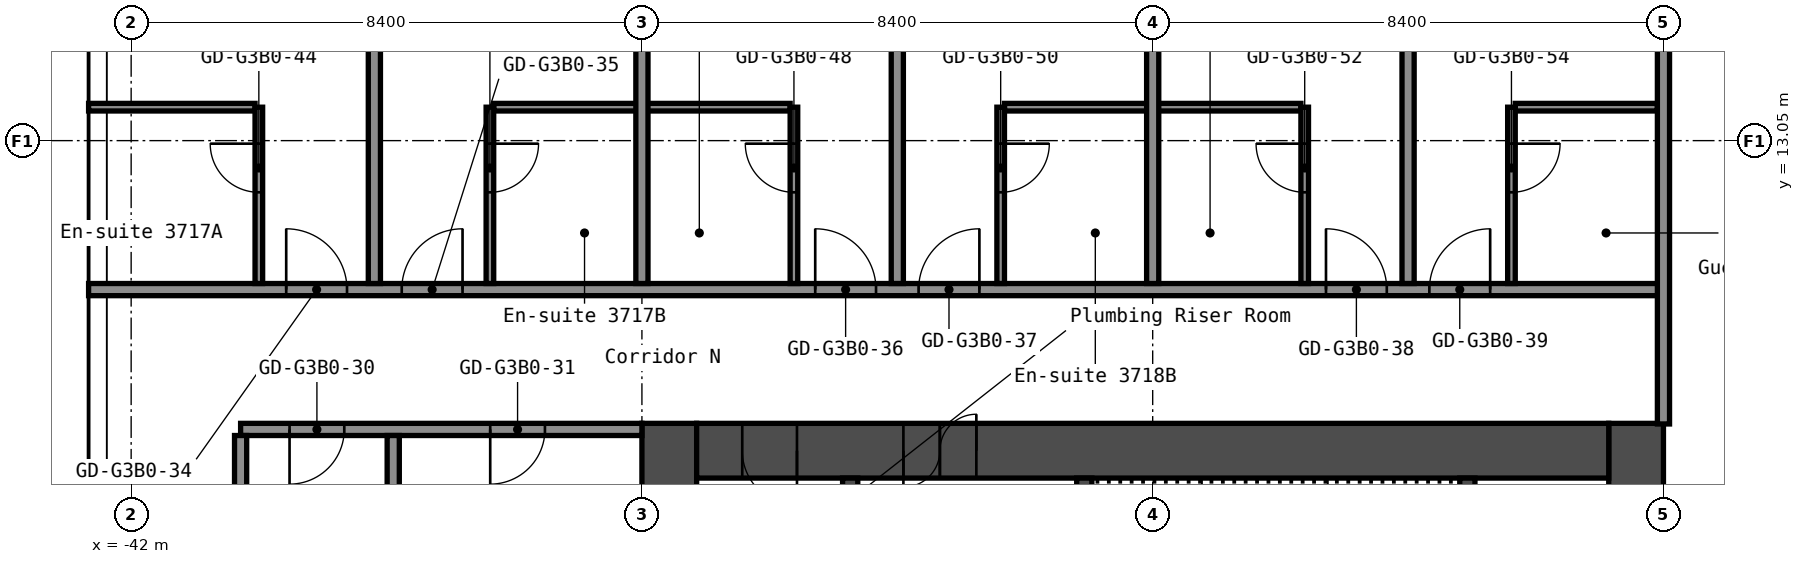
"""IFC4 building model, lengths in metres.
Left out: names, types, materials, properties, quantities, classifications, styles, units other than length and angle.
Written with IfcOpenShell. Run it as: python <this file> out.ifc"""

import sys

from ifc_helpers import new_model, si_unit, direction, frame, frame_2d, origin, place, context, subcontext, project, spatial, rectangle, extrude, element, fill, save


model = new_model("IFC4")
c1 = context("Model", 3, precision=1e-05, world=origin(), true_north=direction((0.0, 1.0)))
c2 = subcontext(c1, "Body", "Model", "MODEL_VIEW")
j1 = project(units=[si_unit("LENGTHUNIT", "METRE"), si_unit("PLANEANGLEUNIT", "RADIAN")], contexts=[c1])
p1 = place(None, origin())
s1 = spatial("IfcSite", under=j1, at=p1, CompositionType="ELEMENT")
p2 = place(p1, origin())
s2 = spatial("IfcBuilding", under=s1, at=p2, CompositionType="ELEMENT")
p3 = place(p2, frame((0.0, 0.0, 134.2)))
s3 = spatial("IfcBuildingStorey", under=s2, at=p3, CompositionType="ELEMENT", Elevation=134.2)
p4 = place(p3, frame((-17.25, -8.4, 0.0), z_axis=(0.0, 0.0, 1.0), x_axis=(0.0, 1.0, 0.0)))
e1 = element("IfcWall", 1, at=p4, inside=s3, PredefinedType="SHEAR", context=c2, shape_type="SweptSolid", body=[
    extrude(rectangle(XDim=16.8, YDim=0.9, at=frame_2d((8.4, 0.0))), origin(), (0.0, 0.0, 1.0), 2.75),
])
p5 = place(p4, frame((7.1, 0.0, 0.0)))
e2 = element("IfcOpeningElement", 2, at=p5, cuts=e1, PredefinedType="OPENING", context=c2, shape_type="SweptSolid", body=[
    extrude(rectangle(XDim=1.6, YDim=2.1, at=frame_2d((0.8, 1.05))), frame((0.0, 0.46, 0.0), z_axis=(0.0, -1.0, 0.0), x_axis=(1.0, 0.0, 0.0)), (0.0, 0.0, 1.0), 0.92),
])
p6 = place(p3, frame((-33.15, -8.4, 0.0), z_axis=(0.0, 0.0, 1.0), x_axis=(0.0, 1.0, 0.0)))
e3 = element("IfcWall", 3, at=p6, inside=s3, PredefinedType="SHEAR", context=c2, shape_type="SweptSolid", body=[
    extrude(rectangle(XDim=16.8, YDim=0.9, at=frame_2d((8.4, 0.0))), origin(), (0.0, 0.0, 1.0), 2.75),
])
p7 = place(p3, frame((-32.7, 7.95, 0.0), z_axis=(0.0, 0.0, 1.0), x_axis=(1.0, 0.0, 0.0)))
e4 = element("IfcWall", 4, at=p7, inside=s3, PredefinedType="SHEAR", context=c2, shape_type="SweptSolid", body=[
    extrude(rectangle(XDim=15.0, YDim=0.9, at=frame_2d((7.5, 0.0))), origin(), (0.0, 0.0, 1.0), 2.75),
])
p8 = place(p7, frame((3.4, 0.0, 0.0)))
e5 = element("IfcOpeningElement", 5, at=p8, cuts=e4, PredefinedType="OPENING", context=c2, shape_type="SweptSolid", body=[
    extrude(rectangle(XDim=1.2, YDim=2.1, at=frame_2d((0.6, 1.05))), frame((0.0, 0.46, 0.0), z_axis=(0.0, -1.0, 0.0), x_axis=(1.0, 0.0, 0.0)), (0.0, 0.0, 1.0), 0.92),
])
p9 = place(p7, frame((0.75, 0.0, 0.0)))
e6 = element("IfcOpeningElement", 6, at=p9, cuts=e4, PredefinedType="OPENING", context=c2, shape_type="SweptSolid", body=[
    extrude(rectangle(XDim=0.9, YDim=2.1, at=frame_2d((0.45, 1.05))), frame((0.0, 0.46, 0.0), z_axis=(0.0, -1.0, 0.0), x_axis=(1.0, 0.0, 0.0)), (0.0, 0.0, 1.0), 0.92),
])
p10 = place(p3, frame((-20.025, 1.2, 0.0), z_axis=(0.0, 0.0, 1.0), x_axis=(0.0, 1.0, 0.0)))
e7 = element("IfcWall", 7, at=p10, inside=s3, PredefinedType="SHEAR", context=c2, shape_type="SweptSolid", body=[
    extrude(rectangle(XDim=6.3, YDim=0.25, at=frame_2d((3.15, 0.0))), origin(), (0.0, 0.0, 1.0), 2.75),
])
p11 = place(p3, frame((-26.325, 3.75, 0.0), z_axis=(0.0, 0.0, 1.0), x_axis=(0.0, 1.0, 0.0)))
e8 = element("IfcWall", 8, at=p11, inside=s3, PredefinedType="SHEAR", context=c2, shape_type="SweptSolid", body=[
    extrude(rectangle(XDim=3.75, YDim=0.25, at=frame_2d((1.875, 0.0))), origin(), (0.0, 0.0, 1.0), 2.75),
])
p12 = place(p11, frame((1.25, 0.0, 0.0)))
e9 = element("IfcOpeningElement", 9, at=p12, cuts=e8, PredefinedType="OPENING", context=c2, shape_type="SweptSolid", body=[
    extrude(rectangle(XDim=1.2, YDim=2.1, at=frame_2d((0.6, 1.05))), frame((0.0, 0.135, 0.0), z_axis=(0.0, -1.0, 0.0), x_axis=(1.0, 0.0, 0.0)), (0.0, 0.0, 1.0), 0.27),
])
p13 = place(p3, frame((-30.175, 1.45, 0.0), z_axis=(0.0, 0.0, 1.0), x_axis=(0.0, 1.0, 0.0)))
e10 = element("IfcWall", 10, at=p13, inside=s3, PredefinedType="SHEAR", context=c2, shape_type="SweptSolid", body=[
    extrude(rectangle(XDim=6.05, YDim=0.25, at=frame_2d((3.025, 0.0))), origin(), (0.0, 0.0, 1.0), 2.75),
])
p14 = place(p13, frame((2.625, 0.0, 0.0)))
e11 = element("IfcOpeningElement", 11, at=p14, cuts=e10, PredefinedType="OPENING", context=c2, shape_type="SweptSolid", body=[
    extrude(rectangle(XDim=1.1, YDim=2.1, at=frame_2d((0.55, 1.05))), frame((0.0, 0.135, 0.0), z_axis=(0.0, -1.0, 0.0), x_axis=(1.0, 0.0, 0.0)), (0.0, 0.0, 1.0), 0.27),
])
p15 = place(p3, frame((-40.2, 8.3, 0.0), z_axis=(0.0, 0.0, 1.0), x_axis=(1.0, 0.0, 0.0)))
e12 = element("IfcWall", 12, at=p15, inside=s3, PredefinedType="PARTITIONING", context=c2, shape_type="SweptSolid", body=[
    extrude(rectangle(XDim=6.6, YDim=0.2, at=frame_2d((3.3, 0.0))), origin(), (0.0, 0.0, 1.0), 2.75),
])
p16 = place(p15, frame((0.805, 0.0, 0.0)))
e13 = element("IfcOpeningElement", 13, at=p16, cuts=e12, PredefinedType="OPENING", context=c2, shape_type="SweptSolid", body=[
    extrude(rectangle(XDim=0.9, YDim=2.1, at=frame_2d((0.45, 1.05))), frame((0.0, 0.11, 0.0), z_axis=(0.0, -1.0, 0.0), x_axis=(1.0, 0.0, 0.0)), (0.0, 0.0, 1.0), 0.22),
])
p17 = place(p15, frame((4.105, 0.0, 0.0)))
e14 = element("IfcOpeningElement", 14, at=p17, cuts=e12, PredefinedType="OPENING", context=c2, shape_type="SweptSolid", body=[
    extrude(rectangle(XDim=0.9, YDim=2.1, at=frame_2d((0.45, 1.05))), frame((0.0, 0.11, 0.0), z_axis=(0.0, -1.0, 0.0), x_axis=(1.0, 0.0, 0.0)), (0.0, 0.0, 1.0), 0.22),
])
p18 = place(p3, frame((-42.7, 10.6, 0.0), z_axis=(0.0, 0.0, 1.0), x_axis=(1.0, 0.0, 0.0)))
e15 = element("IfcWall", 15, at=p18, inside=s3, PredefinedType="PARTITIONING", context=c2, shape_type="SweptSolid", body=[
    extrude(rectangle(XDim=25.9, YDim=0.2, at=frame_2d((12.95, 0.0))), origin(), (0.0, 0.0, 1.0), 2.75),
])
p19 = place(p18, frame((3.25, 0.0, 0.0)))
e16 = element("IfcOpeningElement", 16, at=p19, cuts=e15, PredefinedType="OPENING", context=c2, shape_type="SweptSolid", body=[
    extrude(rectangle(XDim=1.0, YDim=2.1, at=frame_2d((0.5, 1.05))), frame((0.0, 0.11, 0.0), z_axis=(0.0, -1.0, 0.0), x_axis=(1.0, 0.0, 0.0)), (0.0, 0.0, 1.0), 0.22),
])
p20 = place(p18, frame((5.15, 0.0, 0.0)))
e17 = element("IfcOpeningElement", 17, at=p20, cuts=e15, PredefinedType="OPENING", context=c2, shape_type="SweptSolid", body=[
    extrude(rectangle(XDim=1.0, YDim=2.1, at=frame_2d((0.5, 1.05))), frame((0.0, 0.11, 0.0), z_axis=(0.0, -1.0, 0.0), x_axis=(1.0, 0.0, 0.0)), (0.0, 0.0, 1.0), 0.22),
])
p21 = place(p18, frame((11.95, 0.0, 0.0)))
e18 = element("IfcOpeningElement", 18, at=p21, cuts=e15, PredefinedType="OPENING", context=c2, shape_type="SweptSolid", body=[
    extrude(rectangle(XDim=1.0, YDim=2.1, at=frame_2d((0.5, 1.05))), frame((0.0, 0.11, 0.0), z_axis=(0.0, -1.0, 0.0), x_axis=(1.0, 0.0, 0.0)), (0.0, 0.0, 1.0), 0.22),
])
p22 = place(p18, frame((13.65, 0.0, 0.0)))
e19 = element("IfcOpeningElement", 19, at=p22, cuts=e15, PredefinedType="OPENING", context=c2, shape_type="SweptSolid", body=[
    extrude(rectangle(XDim=1.0, YDim=2.1, at=frame_2d((0.5, 1.05))), frame((0.0, 0.11, 0.0), z_axis=(0.0, -1.0, 0.0), x_axis=(1.0, 0.0, 0.0)), (0.0, 0.0, 1.0), 0.22),
])
p23 = place(p18, frame((20.35, 0.0, 0.0)))
e20 = element("IfcOpeningElement", 20, at=p23, cuts=e15, PredefinedType="OPENING", context=c2, shape_type="SweptSolid", body=[
    extrude(rectangle(XDim=1.0, YDim=2.1, at=frame_2d((0.5, 1.05))), frame((0.0, 0.11, 0.0), z_axis=(0.0, -1.0, 0.0), x_axis=(1.0, 0.0, 0.0)), (0.0, 0.0, 1.0), 0.22),
])
p24 = place(p18, frame((22.05, 0.0, 0.0)))
e21 = element("IfcOpeningElement", 21, at=p24, cuts=e15, PredefinedType="OPENING", context=c2, shape_type="SweptSolid", body=[
    extrude(rectangle(XDim=1.0, YDim=2.1, at=frame_2d((0.5, 1.05))), frame((0.0, 0.11, 0.0), z_axis=(0.0, -1.0, 0.0), x_axis=(1.0, 0.0, 0.0)), (0.0, 0.0, 1.0), 0.22),
])
p25 = place(p3, frame((-42.7, 13.6, 0.0), z_axis=(0.0, 0.0, 1.0), x_axis=(1.0, 0.0, 0.0)))
e22 = element("IfcWall", 22, at=p25, inside=s3, PredefinedType="PARTITIONING", context=c2, shape_type="SweptSolid", body=[
    extrude(rectangle(XDim=2.738, YDim=0.125, at=frame_2d((1.369, 0.0))), origin(), (0.0, 0.0, 1.0), 2.75),
])
for number, where, z_axis, x_axis in (
    (23, (-36.038, 13.6, 0.0), (0.0, 0.0, 1.0), (1.0, 0.0, 0.0)),
    (24, (-27.637, 13.6, 0.0), (0.0, 0.0, 1.0), (1.0, 0.0, 0.0)),
):
    element("IfcWall", number, at=place(p3, frame(where, z_axis=z_axis, x_axis=x_axis)), inside=s3, PredefinedType="PARTITIONING", context=c2, shape_type="SweptSolid", body=[
        extrude(rectangle(XDim=4.875, YDim=0.125, at=frame_2d((2.438, 0.0))), origin(), (0.0, 0.0, 1.0), 2.75),
    ])
p26 = place(p3, frame((-19.238, 13.6, 0.0), z_axis=(0.0, 0.0, 1.0), x_axis=(1.0, 0.0, 0.0)))
e25 = element("IfcWall", 25, at=p26, inside=s3, PredefinedType="PARTITIONING", context=c2, shape_type="SweptSolid", body=[
    extrude(rectangle(XDim=2.338, YDim=0.125, at=frame_2d((1.169, 0.0))), origin(), (0.0, 0.0, 1.0), 2.75),
])
p27 = place(p3, frame((-40.2, -8.2, 0.0), z_axis=(0.0, 0.0, 1.0), x_axis=(0.0, 1.0, 0.0)))
e26 = element("IfcWall", 26, at=p27, inside=s3, PredefinedType="PARTITIONING", context=c2, shape_type="SweptSolid", body=[
    extrude(rectangle(XDim=16.4, YDim=0.2, at=frame_2d((8.2, 0.0))), origin(), (0.0, 0.0, 1.0), 2.75),
])
p28 = place(p3, frame((-39.9, 10.7, 0.0), z_axis=(0.0, 0.0, 1.0), x_axis=(0.0, 1.0, 0.0)))
e27 = element("IfcWall", 27, at=p28, inside=s3, PredefinedType="PARTITIONING", context=c2, shape_type="SweptSolid", body=[
    extrude(rectangle(XDim=2.9, YDim=0.125, at=frame_2d((1.45, 0.0))), origin(), (0.0, 0.0, 1.0), 2.75),
])
p29 = place(p28, frame((1.5, 0.0, 0.0)))
e28 = element("IfcOpeningElement", 28, at=p29, cuts=e27, PredefinedType="OPENING", context=c2, shape_type="SweptSolid", body=[
    extrude(rectangle(XDim=0.8, YDim=2.1, at=frame_2d((0.4, 1.05))), frame((0.0, 0.073, 0.0), z_axis=(0.0, -1.0, 0.0), x_axis=(1.0, 0.0, 0.0)), (0.0, 0.0, 1.0), 0.145),
])
p30 = place(p3, frame((-38.0, 10.7, 0.0), z_axis=(0.0, 0.0, 1.0), x_axis=(0.0, 1.0, 0.0)))
e29 = element("IfcWall", 29, at=p30, inside=s3, PredefinedType="PARTITIONING", context=c2, shape_type="SweptSolid", body=[
    extrude(rectangle(XDim=7.6, YDim=0.2, at=frame_2d((3.8, 0.0))), origin(), (0.0, 0.0, 1.0), 2.75),
])
p31 = place(p3, frame((-37.69, 0.0, 0.0), z_axis=(0.0, 0.0, 1.0), x_axis=(0.0, 1.0, 0.0)))
e30 = element("IfcWall", 30, at=p31, inside=s3, PredefinedType="PARTITIONING", context=c2, shape_type="SweptSolid", body=[
    extrude(rectangle(XDim=8.2, YDim=0.2, at=frame_2d((4.1, 0.0))), origin(), (0.0, 0.0, 1.0), 2.75),
])
p32 = place(p3, frame((-36.1, 10.7, 0.0), z_axis=(0.0, 0.0, 1.0), x_axis=(0.0, 1.0, 0.0)))
e31 = element("IfcWall", 31, at=p32, inside=s3, PredefinedType="PARTITIONING", context=c2, shape_type="SweptSolid", body=[
    extrude(rectangle(XDim=2.9, YDim=0.125, at=frame_2d((1.45, 0.0))), origin(), (0.0, 0.0, 1.0), 2.75),
])
p33 = place(p32, frame((1.5, 0.0, 0.0)))
e32 = element("IfcOpeningElement", 32, at=p33, cuts=e31, PredefinedType="OPENING", context=c2, shape_type="SweptSolid", body=[
    extrude(rectangle(XDim=0.8, YDim=2.1, at=frame_2d((0.4, 1.05))), frame((0.0, 0.073, 0.0), z_axis=(0.0, -1.0, 0.0), x_axis=(1.0, 0.0, 0.0)), (0.0, 0.0, 1.0), 0.145),
])
p34 = place(p3, frame((-33.6, 10.7, 0.0), z_axis=(0.0, 0.0, 1.0), x_axis=(0.0, 1.0, 0.0)))
e33 = element("IfcWall", 33, at=p34, inside=s3, PredefinedType="PARTITIONING", context=c2, shape_type="SweptSolid", body=[
    extrude(rectangle(XDim=7.6, YDim=0.2, at=frame_2d((3.8, 0.0))), origin(), (0.0, 0.0, 1.0), 2.75),
])
p35 = place(p3, frame((-31.1, 10.7, 0.0), z_axis=(0.0, 0.0, 1.0), x_axis=(0.0, 1.0, 0.0)))
e34 = element("IfcWall", 34, at=p35, inside=s3, PredefinedType="PARTITIONING", context=c2, shape_type="SweptSolid", body=[
    extrude(rectangle(XDim=2.9, YDim=0.125, at=frame_2d((1.45, 0.0))), origin(), (0.0, 0.0, 1.0), 2.75),
])
p36 = place(p35, frame((1.5, 0.0, 0.0)))
e35 = element("IfcOpeningElement", 35, at=p36, cuts=e34, PredefinedType="OPENING", context=c2, shape_type="SweptSolid", body=[
    extrude(rectangle(XDim=0.8, YDim=2.1, at=frame_2d((0.4, 1.05))), frame((0.0, 0.073, 0.0), z_axis=(0.0, -1.0, 0.0), x_axis=(1.0, 0.0, 0.0)), (0.0, 0.0, 1.0), 0.145),
])
p37 = place(p3, frame((-29.4, 10.7, 0.0), z_axis=(0.0, 0.0, 1.0), x_axis=(0.0, 1.0, 0.0)))
e36 = element("IfcWall", 36, at=p37, inside=s3, PredefinedType="PARTITIONING", context=c2, shape_type="SweptSolid", body=[
    extrude(rectangle(XDim=7.6, YDim=0.2, at=frame_2d((3.8, 0.0))), origin(), (0.0, 0.0, 1.0), 2.75),
])
p38 = place(p3, frame((-27.7, 10.7, 0.0), z_axis=(0.0, 0.0, 1.0), x_axis=(0.0, 1.0, 0.0)))
e37 = element("IfcWall", 37, at=p38, inside=s3, PredefinedType="PARTITIONING", context=c2, shape_type="SweptSolid", body=[
    extrude(rectangle(XDim=2.9, YDim=0.125, at=frame_2d((1.45, 0.0))), origin(), (0.0, 0.0, 1.0), 2.75),
])
p39 = place(p38, frame((1.5, 0.0, 0.0)))
e38 = element("IfcOpeningElement", 38, at=p39, cuts=e37, PredefinedType="OPENING", context=c2, shape_type="SweptSolid", body=[
    extrude(rectangle(XDim=0.8, YDim=2.1, at=frame_2d((0.4, 1.05))), frame((0.0, 0.073, 0.0), z_axis=(0.0, -1.0, 0.0), x_axis=(1.0, 0.0, 0.0)), (0.0, 0.0, 1.0), 0.145),
])
p40 = place(p3, frame((-25.2, 10.7, 0.0), z_axis=(0.0, 0.0, 1.0), x_axis=(0.0, 1.0, 0.0)))
e39 = element("IfcWall", 39, at=p40, inside=s3, PredefinedType="PARTITIONING", context=c2, shape_type="SweptSolid", body=[
    extrude(rectangle(XDim=7.6, YDim=0.2, at=frame_2d((3.8, 0.0))), origin(), (0.0, 0.0, 1.0), 2.75),
])
p41 = place(p3, frame((-22.7, 10.7, 0.0), z_axis=(0.0, 0.0, 1.0), x_axis=(0.0, 1.0, 0.0)))
e40 = element("IfcWall", 40, at=p41, inside=s3, PredefinedType="PARTITIONING", context=c2, shape_type="SweptSolid", body=[
    extrude(rectangle(XDim=2.9, YDim=0.125, at=frame_2d((1.45, 0.0))), origin(), (0.0, 0.0, 1.0), 2.75),
])
p42 = place(p41, frame((1.5, 0.0, 0.0)))
e41 = element("IfcOpeningElement", 41, at=p42, cuts=e40, PredefinedType="OPENING", context=c2, shape_type="SweptSolid", body=[
    extrude(rectangle(XDim=0.8, YDim=2.1, at=frame_2d((0.4, 1.05))), frame((0.0, 0.073, 0.0), z_axis=(0.0, -1.0, 0.0), x_axis=(1.0, 0.0, 0.0)), (0.0, 0.0, 1.0), 0.145),
])
p43 = place(p3, frame((-21.0, 10.7, 0.0), z_axis=(0.0, 0.0, 1.0), x_axis=(0.0, 1.0, 0.0)))
e42 = element("IfcWall", 42, at=p43, inside=s3, PredefinedType="PARTITIONING", context=c2, shape_type="SweptSolid", body=[
    extrude(rectangle(XDim=7.6, YDim=0.2, at=frame_2d((3.8, 0.0))), origin(), (0.0, 0.0, 1.0), 2.75),
])
p44 = place(p3, frame((-19.3, 10.7, 0.0), z_axis=(0.0, 0.0, 1.0), x_axis=(0.0, 1.0, 0.0)))
e43 = element("IfcWall", 43, at=p44, inside=s3, PredefinedType="PARTITIONING", context=c2, shape_type="SweptSolid", body=[
    extrude(rectangle(XDim=2.9, YDim=0.125, at=frame_2d((1.45, 0.0))), origin(), (0.0, 0.0, 1.0), 2.75),
])
p45 = place(p44, frame((1.5, 0.0, 0.0)))
e44 = element("IfcOpeningElement", 44, at=p45, cuts=e43, PredefinedType="OPENING", context=c2, shape_type="SweptSolid", body=[
    extrude(rectangle(XDim=0.8, YDim=2.1, at=frame_2d((0.4, 1.05))), frame((0.0, 0.073, 0.0), z_axis=(0.0, -1.0, 0.0), x_axis=(1.0, 0.0, 0.0)), (0.0, 0.0, 1.0), 0.145),
])
p46 = place(p3, frame((-16.8, 8.39, 0.0), z_axis=(0.0, 0.0, 1.0), x_axis=(0.0, 1.0, 0.0)))
e45 = element("IfcWall", 45, at=p46, inside=s3, PredefinedType="PARTITIONING", context=c2, shape_type="SweptSolid", body=[
    extrude(rectangle(XDim=9.91, YDim=0.2, at=frame_2d((4.955, 0.0))), origin(), (0.0, 0.0, 1.0), 2.75),
])
p47 = place(p8, origin())
e46 = element("IfcDoor", 46, at=p47, inside=s3, OperationType="DOUBLE_DOOR_SINGLE_SWING", PredefinedType="DOOR", context=c2, shape_type="SweptSolid", body=[
    extrude(rectangle(XDim=1.2, YDim=2.1, at=frame_2d((0.6, 1.05))), frame((0.0, 0.025, 0.0), z_axis=(0.0, -1.0, 0.0), x_axis=(1.0, 0.0, 0.0)), (0.0, 0.0, 1.0), 0.05),
])
fill(e5, e46)
p48 = place(p9, origin())
e47 = element("IfcDoor", 47, at=p48, inside=s3, OperationType="SINGLE_SWING_RIGHT", PredefinedType="DOOR", context=c2, shape_type="SweptSolid", body=[
    extrude(rectangle(XDim=0.9, YDim=2.1, at=frame_2d((0.45, 1.05))), frame((0.0, 0.025, 0.0), z_axis=(0.0, -1.0, 0.0), x_axis=(1.0, 0.0, 0.0)), (0.0, 0.0, 1.0), 0.05),
])
fill(e6, e47)
p49 = place(p16, origin())
e48 = element("IfcDoor", 48, at=p49, inside=s3, OperationType="SINGLE_SWING_LEFT", PredefinedType="DOOR", context=c2, shape_type="SweptSolid", body=[
    extrude(rectangle(XDim=0.9, YDim=2.1, at=frame_2d((0.45, 1.05))), frame((0.0, 0.025, 0.0), z_axis=(0.0, -1.0, 0.0), x_axis=(1.0, 0.0, 0.0)), (0.0, 0.0, 1.0), 0.05),
])
fill(e13, e48)
p50 = place(p17, origin())
e49 = element("IfcDoor", 49, at=p50, inside=s3, OperationType="SINGLE_SWING_LEFT", PredefinedType="DOOR", context=c2, shape_type="SweptSolid", body=[
    extrude(rectangle(XDim=0.9, YDim=2.1, at=frame_2d((0.45, 1.05))), frame((0.0, 0.025, 0.0), z_axis=(0.0, -1.0, 0.0), x_axis=(1.0, 0.0, 0.0)), (0.0, 0.0, 1.0), 0.05),
])
fill(e14, e49)
p51 = place(p19, origin())
e50 = element("IfcDoor", 50, at=p51, inside=s3, OperationType="SINGLE_SWING_RIGHT", PredefinedType="DOOR", context=c2, shape_type="SweptSolid", body=[
    extrude(rectangle(XDim=1.0, YDim=2.1, at=frame_2d((0.5, 1.05))), frame((0.0, 0.025, 0.0), z_axis=(0.0, -1.0, 0.0), x_axis=(1.0, 0.0, 0.0)), (0.0, 0.0, 1.0), 0.05),
])
fill(e16, e50)
p52 = place(p20, origin())
e51 = element("IfcDoor", 51, at=p52, inside=s3, OperationType="SINGLE_SWING_LEFT", PredefinedType="DOOR", context=c2, shape_type="SweptSolid", body=[
    extrude(rectangle(XDim=1.0, YDim=2.1, at=frame_2d((0.5, 1.05))), frame((0.0, 0.025, 0.0), z_axis=(0.0, -1.0, 0.0), x_axis=(1.0, 0.0, 0.0)), (0.0, 0.0, 1.0), 0.05),
])
fill(e17, e51)
p53 = place(p21, origin())
e52 = element("IfcDoor", 52, at=p53, inside=s3, OperationType="SINGLE_SWING_RIGHT", PredefinedType="DOOR", context=c2, shape_type="SweptSolid", body=[
    extrude(rectangle(XDim=1.0, YDim=2.1, at=frame_2d((0.5, 1.05))), frame((0.0, 0.025, 0.0), z_axis=(0.0, -1.0, 0.0), x_axis=(1.0, 0.0, 0.0)), (0.0, 0.0, 1.0), 0.05),
])
fill(e18, e52)
p54 = place(p22, origin())
e53 = element("IfcDoor", 53, at=p54, inside=s3, OperationType="SINGLE_SWING_LEFT", PredefinedType="DOOR", context=c2, shape_type="SweptSolid", body=[
    extrude(rectangle(XDim=1.0, YDim=2.1, at=frame_2d((0.5, 1.05))), frame((0.0, 0.025, 0.0), z_axis=(0.0, -1.0, 0.0), x_axis=(1.0, 0.0, 0.0)), (0.0, 0.0, 1.0), 0.05),
])
fill(e19, e53)
p55 = place(p23, origin())
e54 = element("IfcDoor", 54, at=p55, inside=s3, OperationType="SINGLE_SWING_RIGHT", PredefinedType="DOOR", context=c2, shape_type="SweptSolid", body=[
    extrude(rectangle(XDim=1.0, YDim=2.1, at=frame_2d((0.5, 1.05))), frame((0.0, 0.025, 0.0), z_axis=(0.0, -1.0, 0.0), x_axis=(1.0, 0.0, 0.0)), (0.0, 0.0, 1.0), 0.05),
])
fill(e20, e54)
p56 = place(p24, origin())
e55 = element("IfcDoor", 55, at=p56, inside=s3, OperationType="SINGLE_SWING_LEFT", PredefinedType="DOOR", context=c2, shape_type="SweptSolid", body=[
    extrude(rectangle(XDim=1.0, YDim=2.1, at=frame_2d((0.5, 1.05))), frame((0.0, 0.025, 0.0), z_axis=(0.0, -1.0, 0.0), x_axis=(1.0, 0.0, 0.0)), (0.0, 0.0, 1.0), 0.05),
])
fill(e21, e55)
p57 = place(p29, origin())
e56 = element("IfcDoor", 56, at=p57, inside=s3, OperationType="SINGLE_SWING_LEFT", PredefinedType="DOOR", context=c2, shape_type="SweptSolid", body=[
    extrude(rectangle(XDim=0.8, YDim=2.1, at=frame_2d((0.4, 1.05))), frame((0.0, 0.025, 0.0), z_axis=(0.0, -1.0, 0.0), x_axis=(1.0, 0.0, 0.0)), (0.0, 0.0, 1.0), 0.05),
])
fill(e28, e56)
p58 = place(p33, origin())
e57 = element("IfcDoor", 57, at=p58, inside=s3, OperationType="SINGLE_SWING_RIGHT", PredefinedType="DOOR", context=c2, shape_type="SweptSolid", body=[
    extrude(rectangle(XDim=0.8, YDim=2.1, at=frame_2d((0.4, 1.05))), frame((0.0, 0.025, 0.0), z_axis=(0.0, -1.0, 0.0), x_axis=(1.0, 0.0, 0.0)), (0.0, 0.0, 1.0), 0.05),
])
fill(e32, e57)
p59 = place(p36, origin())
e58 = element("IfcDoor", 58, at=p59, inside=s3, OperationType="SINGLE_SWING_LEFT", PredefinedType="DOOR", context=c2, shape_type="SweptSolid", body=[
    extrude(rectangle(XDim=0.8, YDim=2.1, at=frame_2d((0.4, 1.05))), frame((0.0, 0.025, 0.0), z_axis=(0.0, -1.0, 0.0), x_axis=(1.0, 0.0, 0.0)), (0.0, 0.0, 1.0), 0.05),
])
fill(e35, e58)
p60 = place(p39, origin())
e59 = element("IfcDoor", 59, at=p60, inside=s3, OperationType="SINGLE_SWING_RIGHT", PredefinedType="DOOR", context=c2, shape_type="SweptSolid", body=[
    extrude(rectangle(XDim=0.8, YDim=2.1, at=frame_2d((0.4, 1.05))), frame((0.0, 0.025, 0.0), z_axis=(0.0, -1.0, 0.0), x_axis=(1.0, 0.0, 0.0)), (0.0, 0.0, 1.0), 0.05),
])
fill(e38, e59)
p61 = place(p42, origin())
e60 = element("IfcDoor", 60, at=p61, inside=s3, OperationType="SINGLE_SWING_LEFT", PredefinedType="DOOR", context=c2, shape_type="SweptSolid", body=[
    extrude(rectangle(XDim=0.8, YDim=2.1, at=frame_2d((0.4, 1.05))), frame((0.0, 0.025, 0.0), z_axis=(0.0, -1.0, 0.0), x_axis=(1.0, 0.0, 0.0)), (0.0, 0.0, 1.0), 0.05),
])
fill(e41, e60)
p62 = place(p45, origin())
e61 = element("IfcDoor", 61, at=p62, inside=s3, OperationType="SINGLE_SWING_RIGHT", PredefinedType="DOOR", context=c2, shape_type="SweptSolid", body=[
    extrude(rectangle(XDim=0.8, YDim=2.1, at=frame_2d((0.4, 1.05))), frame((0.0, 0.025, 0.0), z_axis=(0.0, -1.0, 0.0), x_axis=(1.0, 0.0, 0.0)), (0.0, 0.0, 1.0), 0.05),
])
fill(e44, e61)
save(model, sys.argv[1])
